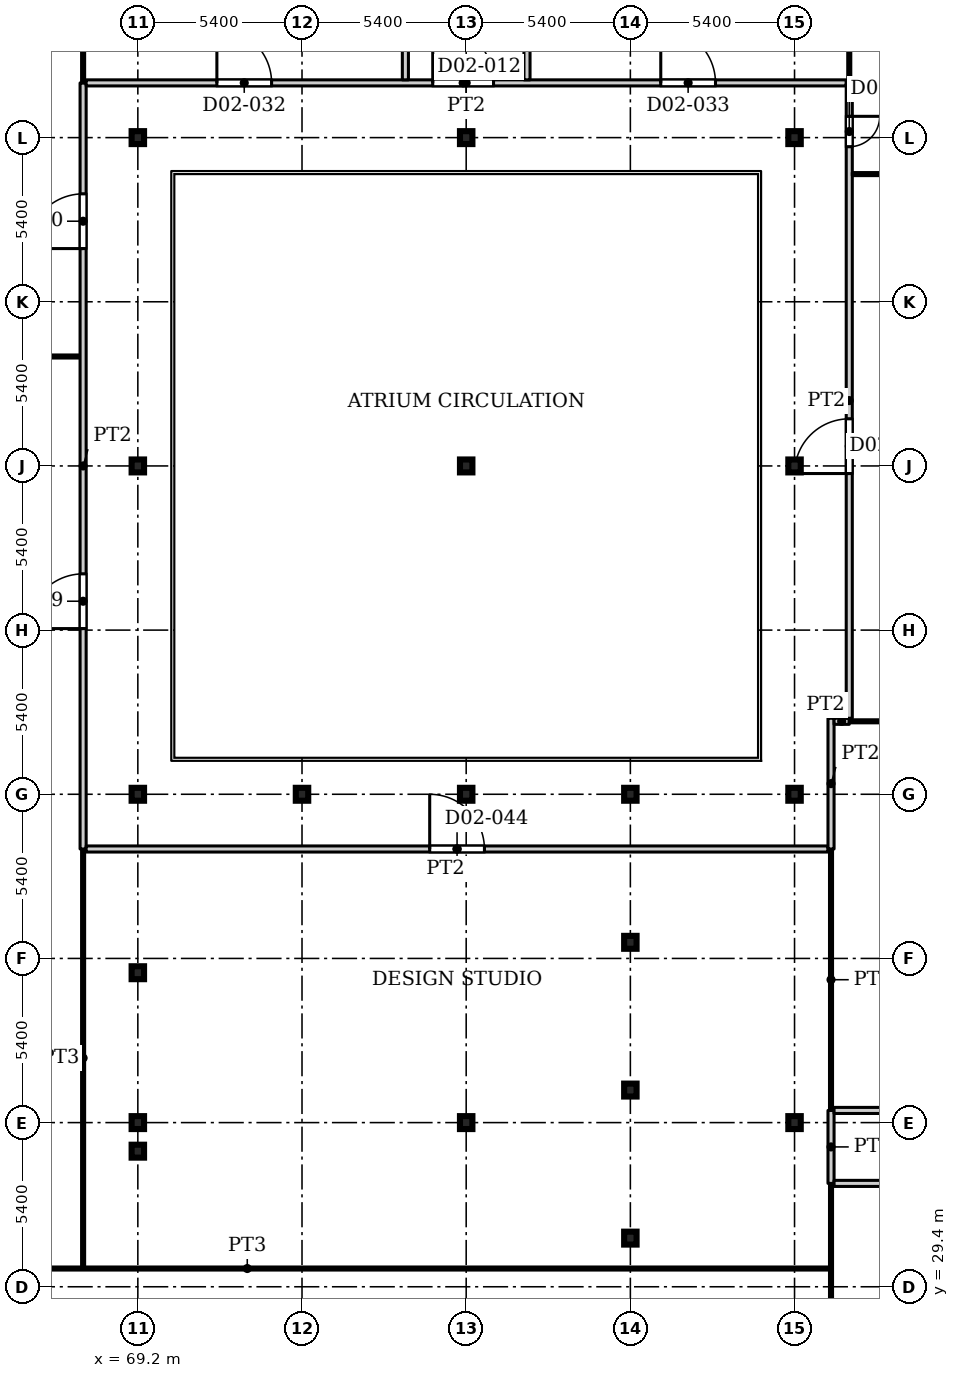
"""IFC4 building model, lengths in metres.
Left out: names, types, materials, properties, quantities, classifications, styles, units other than length and angle.
Written with IfcOpenShell. Run it as: python <this file> out.ifc"""

import sys

from ifc_helpers import new_model, si_unit, direction, frame, frame_2d, origin, origin_2d, place, context, subcontext, project, spatial, rectangle, i_section, extrude, source, transform, mapped, element, fill, save


model = new_model("IFC4")
c1 = context("Model", 3, precision=1e-05, world=origin(), true_north=direction((0.0, 1.0)))
c2 = subcontext(c1, "Body", "Model", "MODEL_VIEW")
j1 = project(units=[si_unit("LENGTHUNIT", "METRE"), si_unit("PLANEANGLEUNIT", "RADIAN")], contexts=[c1])
p1 = place(None, origin())
s1 = spatial("IfcSite", under=j1, at=p1, CompositionType="ELEMENT")
p2 = place(p1, origin())
s2 = spatial("IfcBuilding", under=s1, at=p2, CompositionType="ELEMENT")
p3 = place(p2, frame((0.0, 0.0, 12.5)))
s3 = spatial("IfcBuildingStorey", under=s2, at=p3, CompositionType="ELEMENT", Elevation=12.5)
for number, where, z_axis, x_axis in (
    (1, (69.2, 34.8, 0.0), (0.0, 0.0, 1.0), (1.0, 0.0, 0.0)),
    (2, (80.0, 34.8, 0.0), (0.0, 0.0, 1.0), (1.0, 0.0, 0.0)),
    (3, (90.8, 34.8, 0.0), (0.0, 0.0, 1.0), (1.0, 0.0, 0.0)),
    (4, (69.2, 45.6, 0.0), (0.0, 0.0, 1.0), (1.0, 0.0, 0.0)),
    (5, (80.0, 45.6, 0.0), (0.0, 0.0, 1.0), (1.0, 0.0, 0.0)),
    (6, (90.8, 45.6, 0.0), (0.0, 0.0, 1.0), (1.0, 0.0, 0.0)),
    (7, (69.2, 56.4, 0.0), (0.0, 0.0, 1.0), (1.0, 0.0, 0.0)),
    (8, (80.0, 56.4, 0.0), (0.0, 0.0, 1.0), (1.0, 0.0, 0.0)),
    (9, (90.8, 56.4, 0.0), (0.0, 0.0, 1.0), (1.0, 0.0, 0.0)),
    (10, (69.2, 67.2, 0.0), (0.0, 0.0, 1.0), (1.0, 0.0, 0.0)),
    (11, (80.0, 67.2, 0.0), (0.0, 0.0, 1.0), (1.0, 0.0, 0.0)),
    (12, (90.8, 67.2, 0.0), (0.0, 0.0, 1.0), (1.0, 0.0, 0.0)),
    (13, (74.6, 45.6, 0.0), (0.0, 0.0, 1.0), (1.0, 0.0, 0.0)),
    (14, (85.4, 45.6, 0.0), (0.0, 0.0, 1.0), (1.0, 0.0, 0.0)),
    (15, (85.4, 31.0, 0.0), (0.0, 0.0, 1.0), (1.0, 0.0, 0.0)),
    (16, (69.2, 33.86, 0.0), (0.0, 0.0, 1.0), (1.0, 0.0, 0.0)),
    (17, (85.4, 35.87, 0.0), (0.0, 0.0, 1.0), (1.0, 0.0, 0.0)),
    (18, (69.2, 39.73, 0.0), (0.0, 0.0, 1.0), (1.0, 0.0, 0.0)),
    (19, (85.4, 40.73, 0.0), (0.0, 0.0, 1.0), (1.0, 0.0, 0.0)),
):
    element("IfcColumn", number, at=place(p3, frame(where, z_axis=z_axis, x_axis=x_axis)), inside=s3, PredefinedType="COLUMN", context=c2, shape_type="SweptSolid", body=[
        extrude(i_section(OverallWidth=0.409, OverallDepth=0.425, WebThickness=0.033, FlangeThickness=0.052, FilletRadius=0.013, at=origin_2d()), origin(), (0.0, 0.0, 1.0), 4.5),
    ])
p4 = place(p3, frame((33.45, 60.0, 0.0), z_axis=(0.0, 0.0, 1.0), x_axis=(1.0, 0.0, 0.0)))
e20 = element("IfcWall", 20, at=p4, inside=s3, PredefinedType="PARTITIONING", context=c2, shape_type="SweptSolid", body=[
    extrude(rectangle(XDim=33.85, YDim=0.1, at=frame_2d((16.925, 0.0))), origin(), (0.0, 0.0, 1.0), 4.18),
])
p5 = place(p3, frame((53.649, 30.0, 0.0), z_axis=(0.0, 0.0, 1.0), x_axis=(1.0, 0.0, 0.0)))
e21 = element("IfcWall", 21, at=p5, inside=s3, PredefinedType="PARTITIONING", context=c2, shape_type="SweptSolid", body=[
    extrude(rectangle(XDim=38.301, YDim=0.1, at=frame_2d((19.15, 0.0))), origin(), (0.0, 0.0, 1.0), 4.18),
])
p6 = place(p3, frame((67.4, 30.05, 0.0), z_axis=(0.0, 0.0, 1.0), x_axis=(0.0, 1.0, 0.0)))
e22 = element("IfcWall", 22, at=p6, inside=s3, PredefinedType="PARTITIONING", context=c2, shape_type="SweptSolid", body=[
    extrude(rectangle(XDim=13.75, YDim=0.1, at=frame_2d((6.875, 0.0))), origin(), (0.0, 0.0, 1.0), 4.18),
])
p7 = place(p3, frame((67.4, 43.8, 0.0), z_axis=(0.0, 0.0, 1.0), x_axis=(0.0, 1.0, 0.0)))
e23 = element("IfcWall", 23, at=p7, inside=s3, PredefinedType="PARTITIONING", context=c2, shape_type="SweptSolid", body=[
    extrude(rectangle(XDim=25.2, YDim=0.2, at=frame_2d((12.6, 0.0))), origin(), (0.0, 0.0, 1.0), 4.18),
])
p8 = place(p7, frame((7.25, 0.0, 0.0)))
e24 = element("IfcOpeningElement", 24, at=p8, cuts=e23, PredefinedType="OPENING", context=c2, shape_type="SweptSolid", body=[
    extrude(rectangle(XDim=1.8, YDim=2.1, at=frame_2d((0.9, 1.05))), frame((0.0, 0.11, 0.0), z_axis=(0.0, -1.0, 0.0), x_axis=(1.0, 0.0, 0.0)), (0.0, 0.0, 1.0), 0.22),
])
p9 = place(p7, frame((19.75, 0.0, 0.0)))
e25 = element("IfcOpeningElement", 25, at=p9, cuts=e23, PredefinedType="OPENING", context=c2, shape_type="SweptSolid", body=[
    extrude(rectangle(XDim=1.8, YDim=2.1, at=frame_2d((0.9, 1.05))), frame((0.0, 0.11, 0.0), z_axis=(0.0, -1.0, 0.0), x_axis=(1.0, 0.0, 0.0)), (0.0, 0.0, 1.0), 0.22),
])
p10 = place(p3, frame((67.4, 69.0, 0.0), z_axis=(0.0, 0.0, 1.0), x_axis=(0.0, 1.0, 0.0)))
e26 = element("IfcWall", 26, at=p10, inside=s3, PredefinedType="PARTITIONING", context=c2, shape_type="SweptSolid", body=[
    extrude(rectangle(XDim=21.738, YDim=0.1, at=frame_2d((10.869, 0.0))), origin(), (0.0, 0.0, 1.0), 4.18),
])
p11 = place(p3, frame((67.5, 43.8, 0.0), z_axis=(0.0, 0.0, 1.0), x_axis=(1.0, 0.0, 0.0)))
e27 = element("IfcWall", 27, at=p11, inside=s3, PredefinedType="PARTITIONING", context=c2, shape_type="SweptSolid", body=[
    extrude(rectangle(XDim=24.4, YDim=0.2, at=frame_2d((12.2, 0.0))), origin(), (0.0, 0.0, 1.0), 4.18),
])
p12 = place(p11, frame((11.3, 0.0, 0.0)))
e28 = element("IfcOpeningElement", 28, at=p12, cuts=e27, PredefinedType="OPENING", context=c2, shape_type="SweptSolid", body=[
    extrude(rectangle(XDim=1.8, YDim=2.1, at=frame_2d((0.9, 1.05))), frame((0.0, 0.11, 0.0), z_axis=(0.0, -1.0, 0.0), x_axis=(1.0, 0.0, 0.0)), (0.0, 0.0, 1.0), 0.22),
])
p13 = place(p3, frame((67.5, 69.0, 0.0), z_axis=(0.0, 0.0, 1.0), x_axis=(1.0, 0.0, 0.0)))
e29 = element("IfcWall", 29, at=p13, inside=s3, PredefinedType="PARTITIONING", context=c2, shape_type="SweptSolid", body=[
    extrude(rectangle(XDim=25.0, YDim=0.2, at=frame_2d((12.5, 0.0))), origin(), (0.0, 0.0, 1.0), 4.18),
])
p14 = place(p13, frame((11.4, 0.0, 0.0)))
e30 = element("IfcOpeningElement", 30, at=p14, cuts=e29, PredefinedType="OPENING", context=c2, shape_type="SweptSolid", body=[
    extrude(rectangle(XDim=2.0, YDim=2.1, at=frame_2d((1.0, 1.05))), frame((0.0, 0.11, 0.0), z_axis=(0.0, -1.0, 0.0), x_axis=(1.0, 0.0, 0.0)), (0.0, 0.0, 1.0), 0.22),
])
p15 = place(p13, frame((4.3, 0.0, 0.0)))
e31 = element("IfcOpeningElement", 31, at=p15, cuts=e29, PredefinedType="OPENING", context=c2, shape_type="SweptSolid", body=[
    extrude(rectangle(XDim=1.8, YDim=2.1, at=frame_2d((0.9, 1.05))), frame((0.0, 0.11, 0.0), z_axis=(0.0, -1.0, 0.0), x_axis=(1.0, 0.0, 0.0)), (0.0, 0.0, 1.0), 0.22),
])
p16 = place(p13, frame((18.9, 0.0, 0.0)))
e32 = element("IfcOpeningElement", 32, at=p16, cuts=e29, PredefinedType="OPENING", context=c2, shape_type="SweptSolid", body=[
    extrude(rectangle(XDim=1.8, YDim=2.1, at=frame_2d((0.9, 1.05))), frame((0.0, 0.11, 0.0), z_axis=(0.0, -1.0, 0.0), x_axis=(1.0, 0.0, 0.0)), (0.0, 0.0, 1.0), 0.22),
])
for number, where, z_axis, x_axis in (
    (33, (78.0, 69.1, 0.0), (0.0, 0.0, 1.0), (0.0, 1.0, 0.0)),
    (34, (82.0, 69.1, 0.0), (0.0, 0.0, 1.0), (0.0, 1.0, 0.0)),
):
    element("IfcWall", number, at=place(p3, frame(where, z_axis=z_axis, x_axis=x_axis)), inside=s3, PredefinedType="PARTITIONING", context=c2, shape_type="SweptSolid", body=[
        extrude(rectangle(XDim=21.6, YDim=0.2, at=frame_2d((10.8, 0.0))), origin(), (0.0, 0.0, 1.0), 4.18),
    ])
p17 = place(p3, frame((92.0, 22.05, 0.0), z_axis=(0.0, 0.0, 1.0), x_axis=(0.0, 1.0, 0.0)))
e35 = element("IfcWall", 35, at=p17, inside=s3, PredefinedType="PARTITIONING", context=c2, shape_type="SweptSolid", body=[
    extrude(rectangle(XDim=10.75, YDim=0.1, at=frame_2d((5.375, 0.0))), origin(), (0.0, 0.0, 1.0), 4.18),
])
p18 = place(p3, frame((92.0, 32.8, 0.0), z_axis=(0.0, 0.0, 1.0), x_axis=(0.0, 1.0, 0.0)))
e36 = element("IfcWall", 36, at=p18, inside=s3, PredefinedType="PARTITIONING", context=c2, shape_type="SweptSolid", body=[
    extrude(rectangle(XDim=2.4, YDim=0.2, at=frame_2d((1.2, 0.0))), origin(), (0.0, 0.0, 1.0), 4.18),
])
p19 = place(p3, frame((92.0, 35.2, 0.0), z_axis=(0.0, 0.0, 1.0), x_axis=(0.0, 1.0, 0.0)))
e37 = element("IfcWall", 37, at=p19, inside=s3, PredefinedType="PARTITIONING", context=c2, shape_type="SweptSolid", body=[
    extrude(rectangle(XDim=8.6, YDim=0.1, at=frame_2d((4.3, 0.0))), origin(), (0.0, 0.0, 1.0), 4.18),
])
p20 = place(p3, frame((92.0, 43.8, 0.0), z_axis=(0.0, 0.0, 1.0), x_axis=(0.0, 1.0, 0.0)))
e38 = element("IfcWall", 38, at=p20, inside=s3, PredefinedType="PARTITIONING", context=c2, shape_type="SweptSolid", body=[
    extrude(rectangle(XDim=4.3, YDim=0.2, at=frame_2d((2.15, 0.0))), origin(), (0.0, 0.0, 1.0), 4.18),
])
p21 = place(p3, frame((92.1, 32.8, 0.0), z_axis=(0.0, 0.0, 1.0), x_axis=(1.0, 0.0, 0.0)))
e39 = element("IfcWall", 39, at=p21, inside=s3, PredefinedType="PARTITIONING", context=c2, shape_type="SweptSolid", body=[
    extrude(rectangle(XDim=32.881, YDim=0.2, at=frame_2d((16.44, 0.0))), origin(), (0.0, 0.0, 1.0), 4.18),
])
p22 = place(p21, frame((6.3, 0.0, 0.0)))
e40 = element("IfcOpeningElement", 40, at=p22, cuts=e39, PredefinedType="OPENING", context=c2, shape_type="SweptSolid", body=[
    extrude(rectangle(XDim=1.0, YDim=2.1, at=frame_2d((0.5, 1.05))), frame((0.0, 0.11, 0.0), z_axis=(0.0, -1.0, 0.0), x_axis=(1.0, 0.0, 0.0)), (0.0, 0.0, 1.0), 0.22),
])
p23 = place(p21, frame((19.3, 0.0, 0.0)))
e41 = element("IfcOpeningElement", 41, at=p23, cuts=e39, PredefinedType="OPENING", context=c2, shape_type="SweptSolid", body=[
    extrude(rectangle(XDim=1.0, YDim=2.1, at=frame_2d((0.5, 1.05))), frame((0.0, 0.11, 0.0), z_axis=(0.0, -1.0, 0.0), x_axis=(1.0, 0.0, 0.0)), (0.0, 0.0, 1.0), 0.22),
])
p24 = place(p21, frame((29.05, 0.0, 0.0)))
e42 = element("IfcOpeningElement", 42, at=p24, cuts=e39, PredefinedType="OPENING", context=c2, shape_type="SweptSolid", body=[
    extrude(rectangle(XDim=1.0, YDim=2.1, at=frame_2d((0.5, 1.05))), frame((0.0, 0.11, 0.0), z_axis=(0.0, -1.0, 0.0), x_axis=(1.0, 0.0, 0.0)), (0.0, 0.0, 1.0), 0.22),
])
p25 = place(p3, frame((92.1, 35.2, 0.0), z_axis=(0.0, 0.0, 1.0), x_axis=(1.0, 0.0, 0.0)))
e43 = element("IfcWall", 43, at=p25, inside=s3, PredefinedType="PARTITIONING", context=c2, shape_type="SweptSolid", body=[
    extrude(rectangle(XDim=32.88, YDim=0.2, at=frame_2d((16.44, 0.0))), origin(), (0.0, 0.0, 1.0), 4.18),
])
p26 = place(p25, frame((4.909, 0.0, 0.0)))
e44 = element("IfcOpeningElement", 44, at=p26, cuts=e43, PredefinedType="OPENING", context=c2, shape_type="SweptSolid", body=[
    extrude(rectangle(XDim=1.0, YDim=2.1, at=frame_2d((0.5, 1.05))), frame((0.0, 0.11, 0.0), z_axis=(0.0, -1.0, 0.0), x_axis=(1.0, 0.0, 0.0)), (0.0, 0.0, 1.0), 0.22),
])
p27 = place(p25, frame((13.932, 0.0, 0.0)))
e45 = element("IfcOpeningElement", 45, at=p27, cuts=e43, PredefinedType="OPENING", context=c2, shape_type="SweptSolid", body=[
    extrude(rectangle(XDim=1.0, YDim=2.1, at=frame_2d((0.5, 1.05))), frame((0.0, 0.11, 0.0), z_axis=(0.0, -1.0, 0.0), x_axis=(1.0, 0.0, 0.0)), (0.0, 0.0, 1.0), 0.22),
])
p28 = place(p25, frame((23.091, 0.0, 0.0)))
e46 = element("IfcOpeningElement", 46, at=p28, cuts=e43, PredefinedType="OPENING", context=c2, shape_type="SweptSolid", body=[
    extrude(rectangle(XDim=1.0, YDim=2.1, at=frame_2d((0.5, 1.05))), frame((0.0, 0.11, 0.0), z_axis=(0.0, -1.0, 0.0), x_axis=(1.0, 0.0, 0.0)), (0.0, 0.0, 1.0), 0.22),
])
p29 = place(p25, frame((29.477, 0.0, 0.0)))
e47 = element("IfcOpeningElement", 47, at=p29, cuts=e43, PredefinedType="OPENING", context=c2, shape_type="SweptSolid", body=[
    extrude(rectangle(XDim=1.0, YDim=2.1, at=frame_2d((0.5, 1.05))), frame((0.0, 0.11, 0.0), z_axis=(0.0, -1.0, 0.0), x_axis=(1.0, 0.0, 0.0)), (0.0, 0.0, 1.0), 0.22),
])
p30 = place(p3, frame((92.1, 48.0, 0.0), z_axis=(0.0, 0.0, 1.0), x_axis=(1.0, 0.0, 0.0)))
e48 = element("IfcWall", 48, at=p30, inside=s3, PredefinedType="PARTITIONING", context=c2, shape_type="SweptSolid", body=[
    extrude(rectangle(XDim=0.5, YDim=0.2, at=frame_2d((0.25, 0.0))), origin(), (0.0, 0.0, 1.0), 4.18),
])
p31 = place(p3, frame((92.6, 48.0, 0.0), z_axis=(0.0, 0.0, 1.0), x_axis=(1.0, 0.0, 0.0)))
e49 = element("IfcWall", 49, at=p31, inside=s3, PredefinedType="PARTITIONING", context=c2, shape_type="SweptSolid", body=[
    extrude(rectangle(XDim=20.138, YDim=0.1, at=frame_2d((10.069, 0.0))), origin(), (0.0, 0.0, 1.0), 4.18),
])
p32 = place(p3, frame((92.6, 48.1, 0.0), z_axis=(0.0, 0.0, 1.0), x_axis=(0.0, 1.0, 0.0)))
e50 = element("IfcWall", 50, at=p32, inside=s3, PredefinedType="PARTITIONING", context=c2, shape_type="SweptSolid", body=[
    extrude(rectangle(XDim=20.9, YDim=0.2, at=frame_2d((10.45, 0.0))), origin(), (0.0, 0.0, 1.0), 4.18),
])
p33 = place(p32, frame((8.05, 0.0, 0.0)))
e51 = element("IfcOpeningElement", 51, at=p33, cuts=e50, PredefinedType="OPENING", context=c2, shape_type="SweptSolid", body=[
    extrude(rectangle(XDim=1.8, YDim=2.1, at=frame_2d((0.9, 1.05))), frame((0.0, 0.11, 0.0), z_axis=(0.0, -1.0, 0.0), x_axis=(1.0, 0.0, 0.0)), (0.0, 0.0, 1.0), 0.22),
])
p34 = place(p32, frame((18.8, 0.0, 0.0)))
e52 = element("IfcOpeningElement", 52, at=p34, cuts=e50, PredefinedType="OPENING", context=c2, shape_type="SweptSolid", body=[
    extrude(rectangle(XDim=1.0, YDim=2.1, at=frame_2d((0.5, 1.05))), frame((0.0, 0.11, 0.0), z_axis=(0.0, -1.0, 0.0), x_axis=(1.0, 0.0, 0.0)), (0.0, 0.0, 1.0), 0.22),
])
p35 = place(p3, frame((92.6, 69.0, 0.0), z_axis=(0.0, 0.0, 1.0), x_axis=(0.0, 1.0, 0.0)))
e53 = element("IfcWall", 53, at=p35, inside=s3, PredefinedType="PARTITIONING", context=c2, shape_type="SweptSolid", body=[
    extrude(rectangle(XDim=21.738, YDim=0.1, at=frame_2d((10.869, 0.0))), origin(), (0.0, 0.0, 1.0), 4.18),
])
p36 = place(p3, frame((92.7, 66.0, 0.0), z_axis=(0.0, 0.0, 1.0), x_axis=(1.0, 0.0, 0.0)))
e54 = element("IfcWall", 54, at=p36, inside=s3, PredefinedType="PARTITIONING", context=c2, shape_type="SweptSolid", body=[
    extrude(rectangle(XDim=20.038, YDim=0.1, at=frame_2d((10.019, 0.0))), origin(), (0.0, 0.0, 1.0), 4.18),
])
m1 = source(origin(), c2, "Body", "SweptSolid", [
    extrude(rectangle(XDim=1.8, YDim=2.1, at=frame_2d((0.9, 1.05))), frame((0.0, 0.025, 0.0), z_axis=(0.0, -1.0, 0.0), x_axis=(1.0, 0.0, 0.0)), (0.0, 0.0, 1.0), 0.05),
])
p37 = place(p33, origin())
e55 = element("IfcDoor", 55, at=p37, inside=s3, OperationType="DOUBLE_DOOR_SINGLE_SWING", PredefinedType="DOOR", context=c2, shape_type="MappedRepresentation", body=[
    mapped(m1, transform((0.0, 0.0, 0.0), x_axis=(1.0, 0.0, 0.0), y_axis=(0.0, 1.0, 0.0), z_axis=(0.0, 0.0, 1.0), scale=1.0)),
])
fill(e51, e55)
m2 = source(origin(), c2, "Body", "SweptSolid", [
    extrude(rectangle(XDim=1.0, YDim=2.1, at=frame_2d((0.5, 1.05))), frame((0.0, 0.025, 0.0), z_axis=(0.0, -1.0, 0.0), x_axis=(1.0, 0.0, 0.0)), (0.0, 0.0, 1.0), 0.05),
])
p38 = place(p34, origin())
e56 = element("IfcDoor", 56, at=p38, inside=s3, OperationType="SINGLE_SWING_RIGHT", PredefinedType="DOOR", context=c2, shape_type="MappedRepresentation", body=[
    mapped(m2, transform((0.0, 0.0, 0.0), x_axis=(1.0, 0.0, 0.0), y_axis=(0.0, 1.0, 0.0), z_axis=(0.0, 0.0, 1.0), scale=1.0)),
])
fill(e52, e56)
m3 = source(origin(), c2, "Body", "SweptSolid", [
    extrude(rectangle(XDim=2.0, YDim=2.1, at=frame_2d((1.0, 1.05))), frame((0.0, 0.025, 0.0), z_axis=(0.0, -1.0, 0.0), x_axis=(1.0, 0.0, 0.0)), (0.0, 0.0, 1.0), 0.05),
])
p39 = place(p14, origin())
e57 = element("IfcDoor", 57, at=p39, inside=s3, OperationType="DOUBLE_DOOR_SINGLE_SWING", PredefinedType="DOOR", context=c2, shape_type="MappedRepresentation", body=[
    mapped(m3, transform((0.0, 0.0, 0.0), x_axis=(1.0, 0.0, 0.0), y_axis=(0.0, 1.0, 0.0), z_axis=(0.0, 0.0, 1.0), scale=1.0)),
])
fill(e30, e57)
p40 = place(p15, origin())
e58 = element("IfcDoor", 58, at=p40, inside=s3, OperationType="DOUBLE_DOOR_SINGLE_SWING", PredefinedType="DOOR", context=c2, shape_type="MappedRepresentation", body=[
    mapped(m1, transform((0.0, 0.0, 0.0), x_axis=(1.0, 0.0, 0.0), y_axis=(0.0, 1.0, 0.0), z_axis=(0.0, 0.0, 1.0), scale=1.0)),
])
fill(e31, e58)
p41 = place(p16, origin())
e59 = element("IfcDoor", 59, at=p41, inside=s3, OperationType="DOUBLE_DOOR_SINGLE_SWING", PredefinedType="DOOR", context=c2, shape_type="MappedRepresentation", body=[
    mapped(m1, transform((0.0, 0.0, 0.0), x_axis=(1.0, 0.0, 0.0), y_axis=(0.0, 1.0, 0.0), z_axis=(0.0, 0.0, 1.0), scale=1.0)),
])
fill(e32, e59)
p42 = place(p12, origin())
e60 = element("IfcDoor", 60, at=p42, inside=s3, OperationType="DOUBLE_DOOR_SINGLE_SWING", PredefinedType="DOOR", context=c2, shape_type="MappedRepresentation", body=[
    mapped(m1, transform((0.0, 0.0, 0.0), x_axis=(1.0, 0.0, 0.0), y_axis=(0.0, 1.0, 0.0), z_axis=(0.0, 0.0, 1.0), scale=1.0)),
])
fill(e28, e60)
p43 = place(p8, origin())
e61 = element("IfcDoor", 61, at=p43, inside=s3, OperationType="DOUBLE_DOOR_SINGLE_SWING", PredefinedType="DOOR", context=c2, shape_type="MappedRepresentation", body=[
    mapped(m1, transform((0.0, 0.0, 0.0), x_axis=(1.0, 0.0, 0.0), y_axis=(0.0, 1.0, 0.0), z_axis=(0.0, 0.0, 1.0), scale=1.0)),
])
fill(e24, e61)
p44 = place(p9, origin())
e62 = element("IfcDoor", 62, at=p44, inside=s3, OperationType="DOUBLE_DOOR_SINGLE_SWING", PredefinedType="DOOR", context=c2, shape_type="MappedRepresentation", body=[
    mapped(m1, transform((0.0, 0.0, 0.0), x_axis=(1.0, 0.0, 0.0), y_axis=(0.0, 1.0, 0.0), z_axis=(0.0, 0.0, 1.0), scale=1.0)),
])
fill(e25, e62)
save(model, sys.argv[1])
